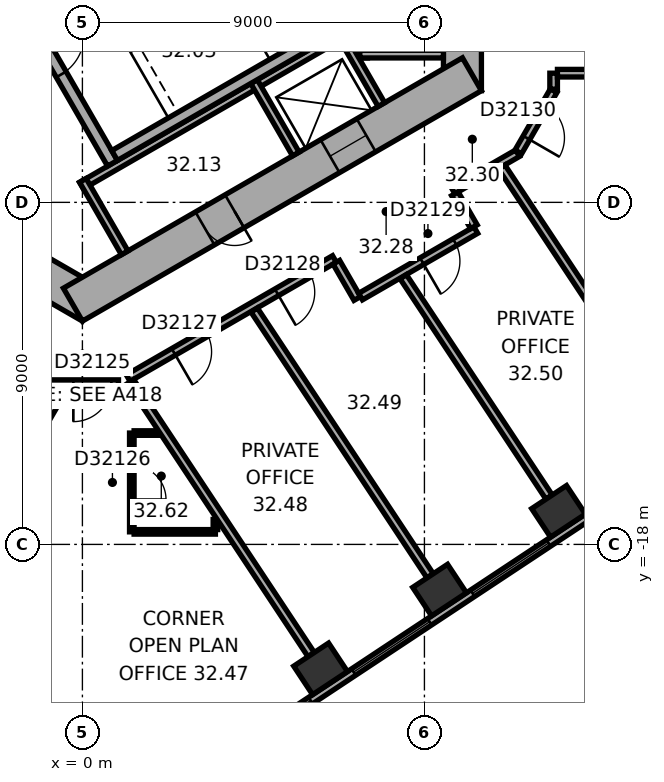
"""IFC4 building model, lengths in metres.
Left out: names, types, materials, properties, quantities, classifications, styles, units other than length and angle.
Written with IfcOpenShell. Run it as: python <this file> out.ifc"""

import sys

from ifc_helpers import new_model, si_unit, direction, frame, frame_2d, origin, origin_2d, place, context, subcontext, project, spatial, rectangle, extrude, element, fill, save


model = new_model("IFC4")
c1 = context("Model", 3, precision=1e-05, world=origin(), true_north=direction((0.0, 1.0)))
c2 = subcontext(c1, "Body", "Model", "MODEL_VIEW")
j1 = project(units=[si_unit("LENGTHUNIT", "METRE"), si_unit("PLANEANGLEUNIT", "RADIAN")], contexts=[c1])
p1 = place(None, origin())
s1 = spatial("IfcSite", under=j1, at=p1, CompositionType="ELEMENT")
p2 = place(p1, origin())
s2 = spatial("IfcBuilding", under=s1, at=p2, CompositionType="ELEMENT")
p3 = place(p2, frame((0.0, 0.0, 131.8)))
s3 = spatial("IfcBuildingStorey", under=s2, at=p3, CompositionType="ELEMENT", Elevation=131.8)
for number, where, z_axis, x_axis in (
    (1, (6.268, -21.274, 0.0), (0.0, 0.0, 1.0), (0.834, 0.552, 0.0)),
    (2, (9.398, -19.202, 0.0), (0.0, 0.0, 1.0), (0.834, 0.552, 0.0)),
    (3, (12.529, -17.13, 0.0), (0.0, 0.0, 1.0), (0.834, 0.552, 0.0)),
):
    element("IfcColumn", number, at=place(p3, frame(where, z_axis=z_axis, x_axis=x_axis)), inside=s3, PredefinedType="COLUMN", context=c2, shape_type="SweptSolid", body=[
        extrude(rectangle(XDim=1.1, YDim=0.9, at=origin_2d()), origin(), (0.0, 0.0, 1.0), 3.7),
    ])
p4 = place(p3, frame((10.0, -6.062, 0.0), z_axis=(0.0, 0.0, 1.0), x_axis=(0.0, 1.0, 0.0)))
e4 = element("IfcWall", 4, at=p4, inside=s3, PredefinedType="SHEAR", context=c2, shape_type="SweptSolid", body=[
    extrude(rectangle(XDim=12.125, YDim=1.0, at=frame_2d((6.062, 0.0))), origin(), (0.0, 0.0, 1.0), 3.7),
])
p5 = place(p4, frame((6.262, 0.0, 0.0)))
e5 = element("IfcOpeningElement", 5, at=p5, cuts=e4, PredefinedType="OPENING", context=c2, shape_type="SweptSolid", body=[
    extrude(rectangle(XDim=1.5, YDim=2.1, at=frame_2d((0.75, 1.05))), frame((0.0, 0.51, 0.0), z_axis=(0.0, -1.0, 0.0), x_axis=(1.0, 0.0, 0.0)), (0.0, 0.0, 1.0), 1.02),
])
p6 = place(p4, frame((1.712, 0.0, 0.0)))
e6 = element("IfcOpeningElement", 6, at=p6, cuts=e4, PredefinedType="OPENING", context=c2, shape_type="SweptSolid", body=[
    extrude(rectangle(XDim=1.1, YDim=2.1, at=frame_2d((0.55, 1.05))), frame((0.0, 0.51, 0.0), z_axis=(0.0, -1.0, 0.0), x_axis=(1.0, 0.0, 0.0)), (0.0, 0.0, 1.0), 1.02),
])
p7 = place(p4, frame((4.312, 0.0, 0.0)))
e7 = element("IfcOpeningElement", 7, at=p7, cuts=e4, PredefinedType="OPENING", context=c2, shape_type="SweptSolid", body=[
    extrude(rectangle(XDim=1.1, YDim=2.1, at=frame_2d((0.55, 1.05))), frame((0.0, 0.51, 0.0), z_axis=(0.0, -1.0, 0.0), x_axis=(1.0, 0.0, 0.0)), (0.0, 0.0, 1.0), 1.02),
])
p8 = place(p3, frame((-10.25, -5.629, 0.0), z_axis=(0.0, 0.0, 1.0), x_axis=(0.866022616891, -0.50000482701, 0.0)))
e8 = element("IfcWall", 8, at=p8, inside=s3, PredefinedType="SHEAR", context=c2, shape_type="SweptSolid", body=[
    extrude(rectangle(XDim=12.125, YDim=1.0, at=frame_2d((6.062, 0.0))), origin(), (0.0, 0.0, 1.0), 3.7),
])
p9 = place(p8, frame((6.262, 0.0, 0.0)))
e9 = element("IfcOpeningElement", 9, at=p9, cuts=e8, PredefinedType="OPENING", context=c2, shape_type="SweptSolid", body=[
    extrude(rectangle(XDim=1.5, YDim=2.1, at=frame_2d((0.75, 1.05))), frame((0.0, 0.51, 0.0), z_axis=(0.0, -1.0, 0.0), x_axis=(1.0, 0.0, 0.0)), (0.0, 0.0, 1.0), 1.02),
])
p10 = place(p8, frame((1.812, 0.0, 0.0)))
e10 = element("IfcOpeningElement", 10, at=p10, cuts=e8, PredefinedType="OPENING", context=c2, shape_type="SweptSolid", body=[
    extrude(rectangle(XDim=0.9, YDim=2.1, at=frame_2d((0.45, 1.05))), frame((0.0, 0.51, 0.0), z_axis=(0.0, -1.0, 0.0), x_axis=(1.0, 0.0, 0.0)), (0.0, 0.0, 1.0), 1.02),
])
p11 = place(p8, frame((4.412, 0.0, 0.0)))
e11 = element("IfcOpeningElement", 11, at=p11, cuts=e8, PredefinedType="OPENING", context=c2, shape_type="SweptSolid", body=[
    extrude(rectangle(XDim=0.9, YDim=2.1, at=frame_2d((0.45, 1.05))), frame((0.0, 0.51, 0.0), z_axis=(0.0, -1.0, 0.0), x_axis=(1.0, 0.0, 0.0)), (0.0, 0.0, 1.0), 1.02),
])
p12 = place(p3, frame((-0.25, -11.691, 0.0), z_axis=(0.0, 0.0, 1.0), x_axis=(0.866022616891, 0.50000482701, 0.0)))
e12 = element("IfcWall", 12, at=p12, inside=s3, PredefinedType="SHEAR", context=c2, shape_type="SweptSolid", body=[
    extrude(rectangle(XDim=12.125, YDim=1.0, at=frame_2d((6.062, 0.0))), origin(), (0.0, 0.0, 1.0), 3.7),
])
p13 = place(p12, frame((4.012, 0.0, 0.0)))
e13 = element("IfcOpeningElement", 13, at=p13, cuts=e12, PredefinedType="OPENING", context=c2, shape_type="SweptSolid", body=[
    extrude(rectangle(XDim=0.9, YDim=2.1, at=frame_2d((0.45, 1.05))), frame((0.0, 0.51, 0.0), z_axis=(0.0, -1.0, 0.0), x_axis=(1.0, 0.0, 0.0)), (0.0, 0.0, 1.0), 1.02),
])
p14 = place(p12, frame((7.812, 0.0, 0.0)))
e14 = element("IfcOpeningElement", 14, at=p14, cuts=e12, PredefinedType="OPENING", context=c2, shape_type="SweptSolid", body=[
    extrude(rectangle(XDim=1.1, YDim=2.1, at=frame_2d((0.55, 1.05))), frame((0.0, 0.51, 0.0), z_axis=(0.0, -1.0, 0.0), x_axis=(1.0, 0.0, 0.0)), (0.0, 0.0, 1.0), 1.02),
])
p15 = place(p3, frame((2.911, -24.156, 0.0), z_axis=(0.0, 0.0, 1.0), x_axis=(0.833882163564, 0.551942512668, 0.0)))
e15 = element("IfcWall", 15, at=p15, inside=s3, PredefinedType="STANDARD", context=c2, shape_type="SweptSolid", body=[
    extrude(rectangle(XDim=20.044, YDim=0.2, at=frame_2d((10.022, 0.0))), origin(), (0.0, 0.0, 1.0), 3.7),
])
p16 = place(p15, frame((1.313, 0.0, 0.9)))
e16 = element("IfcOpeningElement", 16, at=p16, cuts=e15, PredefinedType="OPENING", context=c2, shape_type="SweptSolid", body=[
    extrude(rectangle(XDim=2.4, YDim=2.0, at=frame_2d((1.2, 1.0))), frame((0.0, 0.11, 0.0), z_axis=(0.0, -1.0, 0.0), x_axis=(1.0, 0.0, 0.0)), (0.0, 0.0, 1.0), 0.22),
])
p17 = place(p15, frame((5.067, 0.0, 0.9)))
e17 = element("IfcOpeningElement", 17, at=p17, cuts=e15, PredefinedType="OPENING", context=c2, shape_type="SweptSolid", body=[
    extrude(rectangle(XDim=2.4, YDim=2.0, at=frame_2d((1.2, 1.0))), frame((0.0, 0.11, 0.0), z_axis=(0.0, -1.0, 0.0), x_axis=(1.0, 0.0, 0.0)), (0.0, 0.0, 1.0), 0.22),
])
p18 = place(p15, frame((8.821, 0.0, 0.9)))
e18 = element("IfcOpeningElement", 18, at=p18, cuts=e15, PredefinedType="OPENING", context=c2, shape_type="SweptSolid", body=[
    extrude(rectangle(XDim=2.4, YDim=2.0, at=frame_2d((1.2, 1.0))), frame((0.0, 0.11, 0.0), z_axis=(0.0, -1.0, 0.0), x_axis=(1.0, 0.0, 0.0)), (0.0, 0.0, 1.0), 0.22),
])
p19 = place(p15, frame((12.575, 0.0, 0.9)))
e19 = element("IfcOpeningElement", 19, at=p19, cuts=e15, PredefinedType="OPENING", context=c2, shape_type="SweptSolid", body=[
    extrude(rectangle(XDim=2.4, YDim=2.0, at=frame_2d((1.2, 1.0))), frame((0.0, 0.11, 0.0), z_axis=(0.0, -1.0, 0.0), x_axis=(1.0, 0.0, 0.0)), (0.0, 0.0, 1.0), 0.22),
])
p20 = place(p15, frame((16.329, 0.0, 0.9)))
e20 = element("IfcOpeningElement", 20, at=p20, cuts=e15, PredefinedType="OPENING", context=c2, shape_type="SweptSolid", body=[
    extrude(rectangle(XDim=2.4, YDim=2.0, at=frame_2d((1.2, 1.0))), frame((0.0, 0.11, 0.0), z_axis=(0.0, -1.0, 0.0), x_axis=(1.0, 0.0, 0.0)), (0.0, 0.0, 1.0), 0.22),
])
p21 = place(p3, frame((7.4, -5.2, 0.0), z_axis=(0.0, 0.0, 1.0), x_axis=(0.0, 1.0, 0.0)))
e21 = element("IfcWall", 21, at=p21, inside=s3, PredefinedType="PARTITIONING", context=c2, shape_type="SweptSolid", body=[
    extrude(rectangle(XDim=5.4, YDim=0.2, at=frame_2d((2.7, 0.0))), origin(), (0.0, 0.0, 1.0), 3.42),
])
p22 = place(p3, frame((7.3, -5.1, 0.0), z_axis=(0.0, 0.0, 1.0), x_axis=(1.0, 0.0, 0.0)))
e22 = element("IfcWall", 22, at=p22, inside=s3, PredefinedType="PARTITIONING", context=c2, shape_type="SweptSolid", body=[
    extrude(rectangle(XDim=2.2, YDim=0.2, at=frame_2d((1.1, 0.0))), origin(), (0.0, 0.0, 1.0), 3.42),
])
p23 = place(p3, frame((-0.024, -8.559, 0.0), z_axis=(0.0, 0.0, 1.0), x_axis=(0.866026010844, 0.49999894854, 0.0)))
e23 = element("IfcWall", 23, at=p23, inside=s3, PredefinedType="PARTITIONING", context=c2, shape_type="SweptSolid", body=[
    extrude(rectangle(XDim=8.0, YDim=0.2, at=frame_2d((4.0, 0.0))), origin(), (0.0, 0.0, 1.0), 3.42),
])
for number, where, z_axis, x_axis in (
    (24, (0.013, -8.422, 0.0), (0.0, 0.0, 1.0), (0.5, -0.866, 0.0)),
    (25, (4.516, -5.822, 0.0), (0.0, 0.0, 1.0), (0.5, -0.866, 0.0)),
    (26, (6.768, -4.522, 0.0), (0.0, 0.0, 1.0), (0.5, -0.866, 0.0)),
):
    element("IfcWall", number, at=place(p3, frame(where, z_axis=z_axis, x_axis=x_axis)), inside=s3, PredefinedType="PARTITIONING", context=c2, shape_type="SweptSolid", body=[
        extrude(rectangle(XDim=2.2, YDim=0.2, at=frame_2d((1.1, 0.0))), origin(), (0.0, 0.0, 1.0), 3.42),
    ])
p24 = place(p3, frame((-1.558, -3.902, 0.0), z_axis=(0.0, 0.0, 1.0), x_axis=(0.499977259774, -0.866038532462, 0.0)))
e27 = element("IfcWall", 27, at=p24, inside=s3, PredefinedType="SHEAR", context=c2, shape_type="SweptSolid", body=[
    extrude(rectangle(XDim=4.7, YDim=0.3, at=frame_2d((2.35, 0.0))), origin(), (0.0, 0.0, 1.0), 3.42),
])
p25 = place(p24, frame((0.8, 0.0, 0.0)))
e28 = element("IfcOpeningElement", 28, at=p25, cuts=e27, PredefinedType="OPENING", context=c2, shape_type="SweptSolid", body=[
    extrude(rectangle(XDim=1.2, YDim=2.1, at=frame_2d((0.6, 1.05))), frame((0.0, 0.16, 0.0), z_axis=(0.0, -1.0, 0.0), x_axis=(1.0, 0.0, 0.0)), (0.0, 0.0, 1.0), 0.32),
])
p26 = place(p3, frame((0.847, -7.767, 0.0), z_axis=(0.0, 0.0, 1.0), x_axis=(0.866027801685, 0.499995846692, 0.0)))
e29 = element("IfcWall", 29, at=p26, inside=s3, PredefinedType="SHEAR", context=c2, shape_type="SweptSolid", body=[
    extrude(rectangle(XDim=7.06, YDim=0.3, at=frame_2d((3.53, 0.0))), origin(), (0.0, 0.0, 1.0), 3.42),
])
p27 = place(p3, frame((-4.732, -21.228, 0.0), z_axis=(0.0, 0.0, 1.0), x_axis=(0.500000843414, 0.866024916838, 0.0)))
e30 = element("IfcWall", 30, at=p27, inside=s3, PredefinedType="PARTITIONING", context=c2, shape_type="SweptSolid", body=[
    extrude(rectangle(XDim=8.452, YDim=0.2, at=frame_2d((4.226, 0.0))), origin(), (0.0, 0.0, 1.0), 3.42),
])
p28 = place(p3, frame((-0.91, -13.77, 0.0), z_axis=(0.0, 0.0, 1.0), x_axis=(1.0, 0.0, 0.0)))
e31 = element("IfcWall", 31, at=p28, inside=s3, PredefinedType="PARTITIONING", context=c2, shape_type="SweptSolid", body=[
    extrude(rectangle(XDim=1.86, YDim=0.2, at=frame_2d((0.93, 0.0))), origin(), (0.0, 0.0, 1.0), 3.42),
])
p29 = place(p28, frame((0.672, 0.0, 0.0)))
e32 = element("IfcOpeningElement", 32, at=p29, cuts=e31, PredefinedType="OPENING", context=c2, shape_type="SweptSolid", body=[
    extrude(rectangle(XDim=1.0, YDim=2.1, at=frame_2d((0.5, 1.05))), frame((0.0, 0.11, 0.0), z_axis=(0.0, -1.0, 0.0), x_axis=(1.0, 0.0, 0.0)), (0.0, 0.0, 1.0), 0.22),
])
p30 = place(p3, frame((1.204, -13.623, 0.0), z_axis=(0.0, 0.0, 1.0), x_axis=(0.866031867142, 0.49998880497, 0.0)))
e33 = element("IfcWall", 33, at=p30, inside=s3, PredefinedType="PARTITIONING", context=c2, shape_type="SweptSolid", body=[
    extrude(rectangle(XDim=6.268, YDim=0.2, at=frame_2d((3.134, 0.0))), origin(), (0.0, 0.0, 1.0), 3.42),
])
p31 = place(p30, frame((1.381, 0.0, 0.0)))
e34 = element("IfcOpeningElement", 34, at=p31, cuts=e33, PredefinedType="OPENING", context=c2, shape_type="SweptSolid", body=[
    extrude(rectangle(XDim=1.0, YDim=2.1, at=frame_2d((0.5, 1.05))), frame((0.0, 0.11, 0.0), z_axis=(0.0, -1.0, 0.0), x_axis=(1.0, 0.0, 0.0)), (0.0, 0.0, 1.0), 0.22),
])
p32 = place(p30, frame((4.515, 0.0, 0.0)))
e35 = element("IfcOpeningElement", 35, at=p32, cuts=e33, PredefinedType="OPENING", context=c2, shape_type="SweptSolid", body=[
    extrude(rectangle(XDim=1.0, YDim=2.1, at=frame_2d((0.5, 1.05))), frame((0.0, 0.11, 0.0), z_axis=(0.0, -1.0, 0.0), x_axis=(1.0, 0.0, 0.0)), (0.0, 0.0, 1.0), 0.22),
])
p33 = place(p3, frame((1.3, -17.67, 0.0), z_axis=(0.0, 0.0, 1.0), x_axis=(0.0, 1.0, 0.0)))
e36 = element("IfcWall", 36, at=p33, inside=s3, PredefinedType="PARTITIONING", context=c2, shape_type="SweptSolid", body=[
    extrude(rectangle(XDim=2.6, YDim=0.12, at=frame_2d((1.3, 0.0))), origin(), (0.0, 0.0, 1.0), 3.42),
])
p34 = place(p33, frame((0.85, 0.0, 0.0)))
e37 = element("IfcOpeningElement", 37, at=p34, cuts=e36, PredefinedType="OPENING", context=c2, shape_type="SweptSolid", body=[
    extrude(rectangle(XDim=0.9, YDim=2.1, at=frame_2d((0.45, 1.05))), frame((0.0, 0.07, 0.0), z_axis=(0.0, -1.0, 0.0), x_axis=(1.0, 0.0, 0.0)), (0.0, 0.0, 1.0), 0.14),
])
p35 = place(p3, frame((1.36, -15.07, 0.0), z_axis=(0.0, 0.0, 1.0), x_axis=(1.0, 0.0, 0.0)))
e38 = element("IfcWall", 38, at=p35, inside=s3, PredefinedType="PARTITIONING", context=c2, shape_type="SweptSolid", body=[
    extrude(rectangle(XDim=0.651, YDim=0.12, at=frame_2d((0.325, 0.0))), origin(), (0.0, 0.0, 1.0), 3.42),
])
p36 = place(p3, frame((3.5, -17.67, 0.0), z_axis=(0.0, 0.0, 1.0), x_axis=(-1.0, 0.0, 0.0)))
e39 = element("IfcWall", 39, at=p36, inside=s3, PredefinedType="PARTITIONING", context=c2, shape_type="SweptSolid", body=[
    extrude(rectangle(XDim=2.14, YDim=0.12, at=frame_2d((1.07, 0.0))), origin(), (0.0, 0.0, 1.0), 3.42),
])
p37 = place(p3, frame((3.5, -17.343, 0.0), z_axis=(0.0, 0.0, 1.0), x_axis=(0.0, -1.0, 0.0)))
e40 = element("IfcWall", 40, at=p37, inside=s3, PredefinedType="PARTITIONING", context=c2, shape_type="SweptSolid", body=[
    extrude(rectangle(XDim=0.267, YDim=0.12, at=frame_2d((0.134, 0.0))), origin(), (0.0, 0.0, 1.0), 3.42),
])
p38 = place(p3, frame((6.02, -20.899, 0.0), z_axis=(0.0, 0.0, 1.0), x_axis=(-0.551943990108, 0.833881185651, 0.0)))
e41 = element("IfcWall", 41, at=p38, inside=s3, PredefinedType="PARTITIONING", context=c2, shape_type="SweptSolid", body=[
    extrude(rectangle(XDim=8.615, YDim=0.2, at=frame_2d((4.308, 0.0))), origin(), (0.0, 0.0, 1.0), 3.42),
])
p39 = place(p3, frame((6.682, -10.576, 0.0), z_axis=(0.0, 0.0, 1.0), x_axis=(0.499978356969, -0.866037899034, 0.0)))
e42 = element("IfcWall", 42, at=p39, inside=s3, PredefinedType="PARTITIONING", context=c2, shape_type="SweptSolid", body=[
    extrude(rectangle(XDim=1.101, YDim=0.2, at=frame_2d((0.551, 0.0))), origin(), (0.0, 0.0, 1.0), 3.42),
])
p40 = place(p3, frame((7.319, -11.479, 0.0), z_axis=(0.0, 0.0, 1.0), x_axis=(0.866038154057, 0.49997791523, 0.0)))
e43 = element("IfcWall", 43, at=p40, inside=s3, PredefinedType="PARTITIONING", context=c2, shape_type="SweptSolid", body=[
    extrude(rectangle(XDim=3.502, YDim=0.2, at=frame_2d((1.751, 0.0))), origin(), (0.0, 0.0, 1.0), 3.42),
])
p41 = place(p40, frame((1.865, 0.0, 0.0)))
e44 = element("IfcOpeningElement", 44, at=p41, cuts=e43, PredefinedType="OPENING", context=c2, shape_type="SweptSolid", body=[
    extrude(rectangle(XDim=1.0, YDim=2.1, at=frame_2d((0.5, 1.05))), frame((0.0, 0.11, 0.0), z_axis=(0.0, -1.0, 0.0), x_axis=(1.0, 0.0, 0.0)), (0.0, 0.0, 1.0), 0.22),
])
p42 = place(p3, frame((9.15, -18.827, 0.0), z_axis=(0.0, 0.0, 1.0), x_axis=(-0.551942527453, 0.833882153777, 0.0)))
e45 = element("IfcWall", 45, at=p42, inside=s3, PredefinedType="PARTITIONING", context=c2, shape_type="SweptSolid", body=[
    extrude(rectangle(XDim=8.386, YDim=0.2, at=frame_2d((4.193, 0.0))), origin(), (0.0, 0.0, 1.0), 2.87),
])
p43 = place(p3, frame((9.752, -8.688, 0.0), z_axis=(0.0, 0.0, 1.0), x_axis=(0.865974105138, 0.500088841337, 0.0)))
e46 = element("IfcWall", 46, at=p43, inside=s3, PredefinedType="PARTITIONING", context=c2, shape_type="SweptSolid", body=[
    extrude(rectangle(XDim=1.961, YDim=0.2, at=frame_2d((0.98, 0.0))), origin(), (0.0, 0.0, 1.0), 3.42),
])
p44 = place(p3, frame((10.302, -9.642, 0.0), z_axis=(0.0, 0.0, 1.0), x_axis=(-0.500074377092, 0.865982457891, 0.0)))
e47 = element("IfcWall", 47, at=p44, inside=s3, PredefinedType="PARTITIONING", context=c2, shape_type="SweptSolid", body=[
    extrude(rectangle(XDim=1.001, YDim=0.2, at=frame_2d((0.5, 0.0))), origin(), (0.0, 0.0, 1.0), 3.42),
])
p45 = place(p3, frame((11.47, -7.673, 0.0), z_axis=(0.0, 0.0, 1.0), x_axis=(0.499964847546, 0.866045698112, 0.0)))
e48 = element("IfcWall", 48, at=p45, inside=s3, PredefinedType="PARTITIONING", context=c2, shape_type="SweptSolid", body=[
    extrude(rectangle(XDim=1.86, YDim=0.2, at=frame_2d((0.93, 0.0))), origin(), (0.0, 0.0, 1.0), 3.42),
])
p46 = place(p45, frame((0.43, 0.0, 0.0)))
e49 = element("IfcOpeningElement", 49, at=p46, cuts=e48, PredefinedType="OPENING", context=c2, shape_type="SweptSolid", body=[
    extrude(rectangle(XDim=1.0, YDim=2.1, at=frame_2d((0.5, 1.05))), frame((0.0, 0.11, 0.0), z_axis=(0.0, -1.0, 0.0), x_axis=(1.0, 0.0, 0.0)), (0.0, 0.0, 1.0), 0.22),
])
p47 = place(p3, frame((12.281, -16.755, 0.0), z_axis=(0.0, 0.0, 1.0), x_axis=(-0.551925794663, 0.833893228888, 0.0)))
e50 = element("IfcWall", 50, at=p47, inside=s3, PredefinedType="PARTITIONING", context=c2, shape_type="SweptSolid", body=[
    extrude(rectangle(XDim=6.953, YDim=0.2, at=frame_2d((3.476, 0.0))), origin(), (0.0, 0.0, 1.0), 3.42),
])
p48 = place(p3, frame((12.4, -6.022, 0.0), z_axis=(0.0, 0.0, 1.0), x_axis=(0.0, 1.0, 0.0)))
e51 = element("IfcWall", 51, at=p48, inside=s3, PredefinedType="PARTITIONING", context=c2, shape_type="SweptSolid", body=[
    extrude(rectangle(XDim=0.421, YDim=0.2, at=frame_2d((0.21, 0.0))), origin(), (0.0, 0.0, 1.0), 3.42),
])
p49 = place(p3, frame((12.5, -5.601, 0.0), z_axis=(0.0, 0.0, 1.0), x_axis=(1.0, 0.0, 0.0)))
e52 = element("IfcWall", 52, at=p49, inside=s3, PredefinedType="PARTITIONING", context=c2, shape_type="SweptSolid", body=[
    extrude(rectangle(XDim=1.101, YDim=0.2, at=frame_2d((0.551, 0.0))), origin(), (0.0, 0.0, 1.0), 3.42),
])
p50 = place(p3, frame((15.411, -14.683, 0.0), z_axis=(0.0, 0.0, 1.0), x_axis=(-0.551932106251, 0.833889051427, 0.0)))
e53 = element("IfcWall", 53, at=p50, inside=s3, PredefinedType="PARTITIONING", context=c2, shape_type="SweptSolid", body=[
    extrude(rectangle(XDim=7.926, YDim=0.2, at=frame_2d((3.963, 0.0))), origin(), (0.0, 0.0, 1.0), 2.87),
])
p51 = place(p16, origin())
e54 = element("IfcWindow", 54, at=p51, inside=s3, PartitioningType="SINGLE_PANEL", PredefinedType="WINDOW", context=c2, shape_type="SweptSolid", body=[
    extrude(rectangle(XDim=2.4, YDim=2.0, at=frame_2d((1.2, 1.0))), frame((0.0, 0.03, 0.0), z_axis=(0.0, -1.0, 0.0), x_axis=(1.0, 0.0, 0.0)), (0.0, 0.0, 1.0), 0.06),
])
fill(e16, e54)
p52 = place(p17, origin())
e55 = element("IfcWindow", 55, at=p52, inside=s3, PartitioningType="SINGLE_PANEL", PredefinedType="WINDOW", context=c2, shape_type="SweptSolid", body=[
    extrude(rectangle(XDim=2.4, YDim=2.0, at=frame_2d((1.2, 1.0))), frame((0.0, 0.03, 0.0), z_axis=(0.0, -1.0, 0.0), x_axis=(1.0, 0.0, 0.0)), (0.0, 0.0, 1.0), 0.06),
])
fill(e17, e55)
p53 = place(p18, origin())
e56 = element("IfcWindow", 56, at=p53, inside=s3, PartitioningType="SINGLE_PANEL", PredefinedType="WINDOW", context=c2, shape_type="SweptSolid", body=[
    extrude(rectangle(XDim=2.4, YDim=2.0, at=frame_2d((1.2, 1.0))), frame((0.0, 0.03, 0.0), z_axis=(0.0, -1.0, 0.0), x_axis=(1.0, 0.0, 0.0)), (0.0, 0.0, 1.0), 0.06),
])
fill(e18, e56)
p54 = place(p25, origin())
e57 = element("IfcDoor", 57, at=p54, inside=s3, OperationType="SINGLE_SWING_RIGHT", PredefinedType="DOOR", context=c2, shape_type="SweptSolid", body=[
    extrude(rectangle(XDim=1.2, YDim=2.1, at=frame_2d((0.6, 1.05))), frame((0.0, 0.025, 0.0), z_axis=(0.0, -1.0, 0.0), x_axis=(1.0, 0.0, 0.0)), (0.0, 0.0, 1.0), 0.05),
])
fill(e28, e57)
p55 = place(p13, origin())
e58 = element("IfcDoor", 58, at=p55, inside=s3, OperationType="SINGLE_SWING_LEFT", PredefinedType="DOOR", context=c2, shape_type="SweptSolid", body=[
    extrude(rectangle(XDim=0.9, YDim=2.1, at=frame_2d((0.45, 1.05))), frame((0.0, 0.025, 0.0), z_axis=(0.0, -1.0, 0.0), x_axis=(1.0, 0.0, 0.0)), (0.0, 0.0, 1.0), 0.05),
])
fill(e13, e58)
p56 = place(p14, origin())
e59 = element("IfcDoor", 59, at=p56, inside=s3, OperationType="DOUBLE_DOOR_SLIDING", PredefinedType="DOOR", context=c2, shape_type="SweptSolid", body=[
    extrude(rectangle(XDim=1.1, YDim=2.1, at=frame_2d((0.55, 1.05))), frame((0.0, 0.025, 0.0), z_axis=(0.0, -1.0, 0.0), x_axis=(1.0, 0.0, 0.0)), (0.0, 0.0, 1.0), 0.05),
])
fill(e14, e59)
p57 = place(p29, origin())
e60 = element("IfcDoor", 60, at=p57, inside=s3, OperationType="SINGLE_SWING_LEFT", PredefinedType="DOOR", context=c2, shape_type="SweptSolid", body=[
    extrude(rectangle(XDim=1.0, YDim=2.1, at=frame_2d((0.5, 1.05))), frame((0.0, 0.025, 0.0), z_axis=(0.0, -1.0, 0.0), x_axis=(1.0, 0.0, 0.0)), (0.0, 0.0, 1.0), 0.05),
])
fill(e32, e60)
p58 = place(p34, origin())
e61 = element("IfcDoor", 61, at=p58, inside=s3, OperationType="SINGLE_SWING_LEFT", PredefinedType="DOOR", context=c2, shape_type="SweptSolid", body=[
    extrude(rectangle(XDim=0.9, YDim=2.1, at=frame_2d((0.45, 1.05))), frame((0.0, 0.025, 0.0), z_axis=(0.0, -1.0, 0.0), x_axis=(1.0, 0.0, 0.0)), (0.0, 0.0, 1.0), 0.05),
])
fill(e37, e61)
p59 = place(p31, origin())
e62 = element("IfcDoor", 62, at=p59, inside=s3, OperationType="SINGLE_SWING_LEFT", PredefinedType="DOOR", context=c2, shape_type="SweptSolid", body=[
    extrude(rectangle(XDim=1.0, YDim=2.1, at=frame_2d((0.5, 1.05))), frame((0.0, 0.025, 0.0), z_axis=(0.0, -1.0, 0.0), x_axis=(1.0, 0.0, 0.0)), (0.0, 0.0, 1.0), 0.05),
])
fill(e34, e62)
p60 = place(p32, origin())
e63 = element("IfcDoor", 63, at=p60, inside=s3, OperationType="SINGLE_SWING_LEFT", PredefinedType="DOOR", context=c2, shape_type="SweptSolid", body=[
    extrude(rectangle(XDim=1.0, YDim=2.1, at=frame_2d((0.5, 1.05))), frame((0.0, 0.025, 0.0), z_axis=(0.0, -1.0, 0.0), x_axis=(1.0, 0.0, 0.0)), (0.0, 0.0, 1.0), 0.05),
])
fill(e35, e63)
p61 = place(p41, origin())
e64 = element("IfcDoor", 64, at=p61, inside=s3, OperationType="SINGLE_SWING_LEFT", PredefinedType="DOOR", context=c2, shape_type="SweptSolid", body=[
    extrude(rectangle(XDim=1.0, YDim=2.1, at=frame_2d((0.5, 1.05))), frame((0.0, 0.025, 0.0), z_axis=(0.0, -1.0, 0.0), x_axis=(1.0, 0.0, 0.0)), (0.0, 0.0, 1.0), 0.05),
])
fill(e44, e64)
p62 = place(p46, origin())
e65 = element("IfcDoor", 65, at=p62, inside=s3, OperationType="SINGLE_SWING_LEFT", PredefinedType="DOOR", context=c2, shape_type="SweptSolid", body=[
    extrude(rectangle(XDim=1.0, YDim=2.1, at=frame_2d((0.5, 1.05))), frame((0.0, 0.025, 0.0), z_axis=(0.0, -1.0, 0.0), x_axis=(1.0, 0.0, 0.0)), (0.0, 0.0, 1.0), 0.05),
])
fill(e49, e65)
save(model, sys.argv[1])
